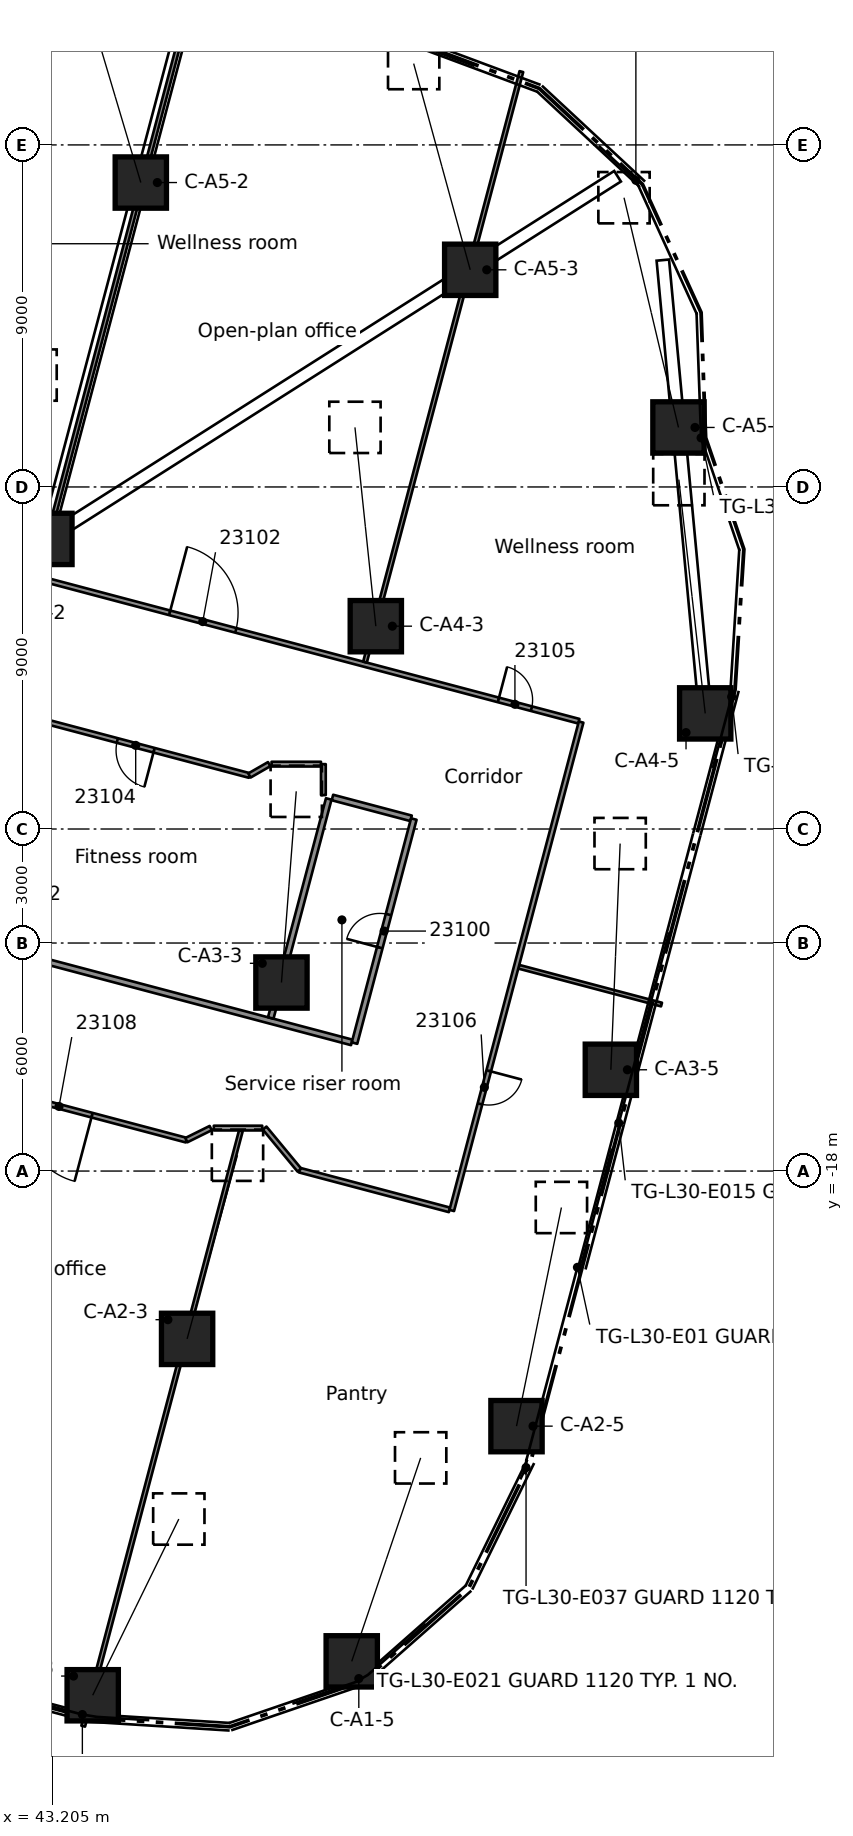
"""IFC4 building model, lengths in metres.
Left out: names, types, materials, properties, quantities, classifications, styles, units other than length and angle.
Written with IfcOpenShell. Run it as: python <this file> out.ifc"""

import sys

from ifc_helpers import new_model, si_unit, direction, frame, frame_2d, origin, origin_2d, place, context, subcontext, project, spatial, rectangle, extrude, element, fill, save


model = new_model("IFC4")
c1 = context("Model", 3, precision=1e-05, world=origin(), true_north=direction((0.0, 1.0)))
c2 = subcontext(c1, "Body", "Model", "MODEL_VIEW")
j1 = project(units=[si_unit("LENGTHUNIT", "METRE"), si_unit("PLANEANGLEUNIT", "RADIAN")], contexts=[c1])
p1 = place(None, origin())
s1 = spatial("IfcSite", under=j1, at=p1, CompositionType="ELEMENT")
p2 = place(p1, origin())
s2 = spatial("IfcBuilding", under=s1, at=p2, CompositionType="ELEMENT")
p3 = place(p2, frame((0.0, 0.0, 119.7)))
s3 = spatial("IfcBuildingStorey", under=s2, at=p3, CompositionType="ELEMENT", Elevation=119.7)
p4 = place(p3, frame((44.269, -31.793, 0.593), z_axis=(0.385435051293, 0.788769306025, 0.47883483907), x_axis=(-0.898467718032, 0.439039587798, 0.0)))
e1 = element("IfcColumn", 1, at=p4, inside=s3, PredefinedType="COLUMN", context=c2, shape_type="SweptSolid", body=[
    extrude(rectangle(XDim=1.35, YDim=1.35, at=origin_2d()), origin(), (0.0, 0.0, 1.0), 5.879),
])
p5 = place(p3, frame((51.085, -30.901, 0.605), z_axis=(0.287773476059, 0.849338432906, 0.442504974962), x_axis=(-0.94711260935, 0.320901394841, 0.0)))
e2 = element("IfcColumn", 2, at=p5, inside=s3, PredefinedType="COLUMN", context=c2, shape_type="SweptSolid", body=[
    extrude(rectangle(XDim=1.35, YDim=1.35, at=origin_2d()), origin(), (0.0, 0.0, 1.0), 6.303),
])
p6 = place(p3, frame((46.753, -22.416, 0.588), z_axis=(0.230570287465, 0.840104405285, 0.490980580837), x_axis=(-0.964339803907, 0.264667229933, 0.0)))
e3 = element("IfcColumn", 3, at=p6, inside=s3, PredefinedType="COLUMN", context=c2, shape_type="SweptSolid", body=[
    extrude(rectangle(XDim=1.35, YDim=1.35, at=origin_2d()), origin(), (0.0, 0.0, 1.0), 5.752),
])
p7 = place(p3, frame((55.421, -24.712, 0.61), z_axis=(0.181928790366, 0.885371750556, 0.42780694075), x_axis=(-0.979534245021, 0.201277576574, 0.0)))
e4 = element("IfcColumn", 4, at=p7, inside=s3, PredefinedType="COLUMN", context=c2, shape_type="SweptSolid", body=[
    extrude(rectangle(XDim=1.35, YDim=1.35, at=origin_2d()), origin(), (0.0, 0.0, 1.0), 6.498),
])
p8 = place(p3, frame((49.236, -13.039, 0.589), z_axis=(0.067270096291, 0.870203938653, 0.488077698013), x_axis=(-0.997025384371, 0.077073879619, 0.0)))
e5 = element("IfcColumn", 5, at=p8, inside=s3, PredefinedType="COLUMN", context=c2, shape_type="SweptSolid", body=[
    extrude(rectangle(XDim=1.35, YDim=1.35, at=origin_2d()), origin(), (0.0, 0.0, 1.0), 5.781),
])
p9 = place(p3, frame((57.904, -15.335, 0.612), z_axis=(0.037110733148, 0.905628191614, 0.422445703066), x_axis=(-0.999161462132, 0.040943529294, 0.0)))
e6 = element("IfcColumn", 6, at=p9, inside=s3, PredefinedType="COLUMN", context=c2, shape_type="SweptSolid", body=[
    extrude(rectangle(XDim=1.35, YDim=1.35, at=origin_2d()), origin(), (0.0, 0.0, 1.0), 6.572),
])
p10 = place(p3, frame((43.051, -1.367, 0.562), z_axis=(-0.077735925717, 0.829402402608, 0.553216757159), x_axis=(-0.995636518253, -0.093316255392, 0.0)))
e7 = element("IfcColumn", 7, at=p10, inside=s3, PredefinedType="COLUMN", context=c2, shape_type="SweptSolid", body=[
    extrude(rectangle(XDim=1.35, YDim=1.35, at=origin_2d()), origin(), (0.0, 0.0, 1.0), 5.198),
])
p11 = place(p3, frame((51.719, -3.663, 0.595), z_axis=(-0.092079198253, 0.877270333915, 0.471081927569), x_axis=(-0.994536691035, -0.104387595937, 0.0)))
e8 = element("IfcColumn", 8, at=p11, inside=s3, PredefinedType="COLUMN", context=c2, shape_type="SweptSolid", body=[
    extrude(rectangle(XDim=1.35, YDim=1.35, at=origin_2d()), origin(), (0.0, 0.0, 1.0), 5.963),
])
p12 = place(p3, frame((60.387, -5.958, 0.616), z_axis=(-0.102327587164, 0.907158183888, 0.408158173152), x_axis=(-0.993698136822, -0.112089307595, 0.0)))
e9 = element("IfcColumn", 9, at=p12, inside=s3, PredefinedType="COLUMN", context=c2, shape_type="SweptSolid", body=[
    extrude(rectangle(XDim=1.35, YDim=1.35, at=origin_2d()), origin(), (0.0, 0.0, 1.0), 6.781),
])
p13 = place(p3, frame((45.535, 8.01, 0.578), z_axis=(-0.244240111636, 0.820186799174, 0.517339716558), x_axis=(-0.958408331569, -0.285400543061, 0.0)))
e10 = element("IfcColumn", 10, at=p13, inside=s3, PredefinedType="COLUMN", context=c2, shape_type="SweptSolid", body=[
    extrude(rectangle(XDim=1.35, YDim=1.35, at=origin_2d()), origin(), (0.0, 0.0, 1.0), 5.499),
])
p14 = place(p3, frame((54.203, 5.714, 0.605), z_axis=(-0.236905885144, 0.86396396315, 0.444344316901), x_axis=(-0.964400394213, -0.264446364396, 0.0)))
e11 = element("IfcColumn", 11, at=p14, inside=s3, PredefinedType="COLUMN", context=c2, shape_type="SweptSolid", body=[
    extrude(rectangle(XDim=1.35, YDim=1.35, at=origin_2d()), origin(), (0.0, 0.0, 1.0), 6.28),
])
p15 = place(p3, frame((59.683, 1.566, 0.617), z_axis=(-0.210720596, 0.888867577098, 0.40683075204), x_axis=(-0.973031331212, -0.230672990356, 0.0)))
e12 = element("IfcColumn", 12, at=p15, inside=s3, PredefinedType="COLUMN", context=c2, shape_type="SweptSolid", body=[
    extrude(rectangle(XDim=1.35, YDim=1.35, at=origin_2d()), origin(), (0.0, 0.0, 1.0), 6.801),
])
p16 = place(p3, frame((53.657, -19.021, 0.0), z_axis=(0.0, 0.0, 1.0), x_axis=(-0.966669998508, 0.25602561197, 0.0)))
e13 = element("IfcWall", 13, at=p16, inside=s3, PredefinedType="PARTITIONING", context=c2, shape_type="SweptSolid", body=[
    extrude(rectangle(XDim=4.085, YDim=0.125, at=frame_2d((2.042, 0.0))), origin(), (0.0, 0.0, 1.0), 3.58),
])
p17 = place(p3, frame((46.733, -17.187, 0.0), z_axis=(0.0, 0.0, 1.0), x_axis=(-0.966684476385, 0.255970941937, 0.0)))
e14 = element("IfcWall", 14, at=p17, inside=s3, PredefinedType="PARTITIONING", context=c2, shape_type="SweptSolid", body=[
    extrude(rectangle(XDim=17.807, YDim=0.125, at=frame_2d((8.904, 0.0))), origin(), (0.0, 0.0, 1.0), 3.58),
])
p18 = place(p17, frame((11.925, 0.0, 0.0)))
e15 = element("IfcOpeningElement", 15, at=p18, cuts=e14, PredefinedType="OPENING", context=c2, shape_type="SweptSolid", body=[
    extrude(rectangle(XDim=1.8, YDim=2.1, at=frame_2d((0.9, 1.05))), frame((0.0, 0.073, 0.0), z_axis=(0.0, -1.0, 0.0), x_axis=(1.0, 0.0, 0.0)), (0.0, 0.0, 1.0), 0.145),
])
p19 = place(p17, frame((2.566, 0.0, 0.0)))
e16 = element("IfcOpeningElement", 16, at=p19, cuts=e14, PredefinedType="OPENING", context=c2, shape_type="SweptSolid", body=[
    extrude(rectangle(XDim=1.8, YDim=2.1, at=frame_2d((0.9, 1.05))), frame((0.0, 0.073, 0.0), z_axis=(0.0, -1.0, 0.0), x_axis=(1.0, 0.0, 0.0)), (0.0, 0.0, 1.0), 0.145),
])
p20 = place(p3, frame((30.589, -9.187, 0.0), z_axis=(0.0, 0.0, 1.0), x_axis=(0.966677828303, -0.255996047367, 0.0)))
e17 = element("IfcWall", 17, at=p20, inside=s3, PredefinedType="PARTITIONING", context=c2, shape_type="SweptSolid", body=[
    extrude(rectangle(XDim=21.203, YDim=0.15, at=frame_2d((10.602, 0.0))), origin(), (0.0, 0.0, 1.0), 3.58),
])
p21 = place(p20, frame((4.6, 0.0, 0.0)))
e18 = element("IfcOpeningElement", 18, at=p21, cuts=e17, PredefinedType="OPENING", context=c2, shape_type="SweptSolid", body=[
    extrude(rectangle(XDim=0.9, YDim=2.1, at=frame_2d((0.45, 1.05))), frame((0.0, 0.085, 0.0), z_axis=(0.0, -1.0, 0.0), x_axis=(1.0, 0.0, 0.0)), (0.0, 0.0, 1.0), 0.17),
])
p22 = place(p3, frame((55.48, -12.624, 0.0), z_axis=(0.0, 0.0, 1.0), x_axis=(0.966682829602, -0.255977161, 0.0)))
e19 = element("IfcWall", 19, at=p22, inside=s3, PredefinedType="PARTITIONING", context=c2, shape_type="SweptSolid", body=[
    extrude(rectangle(XDim=3.886, YDim=0.1, at=frame_2d((1.943, 0.0))), origin(), (0.0, 0.0, 1.0), 3.58),
])
p23 = place(p3, frame((48.393, -7.592, 0.0), z_axis=(0.0, 0.0, 1.0), x_axis=(-0.966683482387, 0.255974695781, 0.0)))
e20 = element("IfcWall", 20, at=p23, inside=s3, PredefinedType="PARTITIONING", context=c2, shape_type="SweptSolid", body=[
    extrude(rectangle(XDim=16.748, YDim=0.125, at=frame_2d((8.374, 0.0))), origin(), (0.0, 0.0, 1.0), 3.58),
])
p24 = place(p23, frame((2.596, 0.0, 0.0)))
e21 = element("IfcOpeningElement", 21, at=p24, cuts=e20, PredefinedType="OPENING", context=c2, shape_type="SweptSolid", body=[
    extrude(rectangle(XDim=1.0, YDim=2.1, at=frame_2d((0.5, 1.05))), frame((0.0, 0.073, 0.0), z_axis=(0.0, -1.0, 0.0), x_axis=(1.0, 0.0, 0.0)), (0.0, 0.0, 1.0), 0.145),
])
p25 = place(p3, frame((50.578, -8.171, 0.0), z_axis=(0.0, 0.0, 1.0), x_axis=(0.966659569992, -0.256064983437, 0.0)))
e22 = element("IfcWall", 22, at=p25, inside=s3, PredefinedType="PARTITIONING", context=c2, shape_type="SweptSolid", body=[
    extrude(rectangle(XDim=2.14, YDim=0.15, at=frame_2d((1.07, 0.0))), origin(), (0.0, 0.0, 1.0), 3.58),
])
p26 = place(p3, frame((32.9, 0.236, 0.0), z_axis=(0.0, 0.0, 1.0), x_axis=(0.966662717932, -0.256053099493, 0.0)))
e23 = element("IfcWall", 23, at=p26, inside=s3, PredefinedType="PARTITIONING", context=c2, shape_type="SweptSolid", body=[
    extrude(rectangle(XDim=24.995, YDim=0.125, at=frame_2d((12.498, 0.0))), origin(), (0.0, 0.0, 1.0), 3.58),
])
p27 = place(p26, frame((4.55, 0.0, 0.0)))
e24 = element("IfcOpeningElement", 24, at=p27, cuts=e23, PredefinedType="OPENING", context=c2, shape_type="SweptSolid", body=[
    extrude(rectangle(XDim=0.9, YDim=2.1, at=frame_2d((0.45, 1.05))), frame((0.0, 0.073, 0.0), z_axis=(0.0, -1.0, 0.0), x_axis=(1.0, 0.0, 0.0)), (0.0, 0.0, 1.0), 0.145),
])
p28 = place(p26, frame((13.857, 0.0, 0.0)))
e25 = element("IfcOpeningElement", 25, at=p28, cuts=e23, PredefinedType="OPENING", context=c2, shape_type="SweptSolid", body=[
    extrude(rectangle(XDim=1.8, YDim=2.1, at=frame_2d((0.9, 1.05))), frame((0.0, 0.073, 0.0), z_axis=(0.0, -1.0, 0.0), x_axis=(1.0, 0.0, 0.0)), (0.0, 0.0, 1.0), 0.145),
])
p29 = place(p26, frame((22.805, 0.0, 0.0)))
e26 = element("IfcOpeningElement", 26, at=p29, cuts=e23, PredefinedType="OPENING", context=c2, shape_type="SweptSolid", body=[
    extrude(rectangle(XDim=0.9, YDim=2.1, at=frame_2d((0.45, 1.05))), frame((0.0, 0.073, 0.0), z_axis=(0.0, -1.0, 0.0), x_axis=(1.0, 0.0, 0.0)), (0.0, 0.0, 1.0), 0.145),
])
p30 = place(p3, frame((47.456, -16.869, 0.0), z_axis=(0.0, 0.0, 1.0), x_axis=(1.0, 0.0, 0.0)))
e27 = element("IfcWall", 27, at=p30, inside=s3, PredefinedType="PARTITIONING", context=c2, shape_type="SweptSolid", body=[
    extrude(rectangle(XDim=1.274, YDim=0.125, at=frame_2d((0.637, 0.0))), origin(), (0.0, 0.0, 1.0), 3.58),
])
p31 = place(p3, frame((48.975, -7.293, 0.0), z_axis=(0.0, 0.0, 1.0), x_axis=(1.0, 0.0, 0.0)))
e28 = element("IfcWall", 28, at=p31, inside=s3, PredefinedType="PARTITIONING", context=c2, shape_type="SweptSolid", body=[
    extrude(rectangle(XDim=1.301, YDim=0.125, at=frame_2d((0.65, 0.0))), origin(), (0.0, 0.0, 1.0), 3.58),
])
p32 = place(p3, frame((46.733, -17.187, 0.0), z_axis=(0.0, 0.0, 1.0), x_axis=(0.895787517552, 0.444482534413, 0.0)))
e29 = element("IfcWall", 29, at=p32, inside=s3, PredefinedType="PARTITIONING", context=c2, shape_type="SweptSolid", body=[
    extrude(rectangle(XDim=0.716, YDim=0.125, at=frame_2d((0.358, 0.0))), origin(), (0.0, 0.0, 1.0), 3.58),
])
p33 = place(p3, frame((57.121, -6.186, 0.0), z_axis=(0.0, 0.0, 1.0), x_axis=(-0.256054079854, -0.96666245825, 0.0)))
e30 = element("IfcWall", 30, at=p33, inside=s3, PredefinedType="PARTITIONING", context=c2, shape_type="SweptSolid", body=[
    extrude(rectangle(XDim=13.294, YDim=0.125, at=frame_2d((6.647, 0.0))), origin(), (0.0, 0.0, 1.0), 3.58),
])
p34 = place(p33, frame((9.493, 0.0, 0.0)))
e31 = element("IfcOpeningElement", 31, at=p34, cuts=e30, PredefinedType="OPENING", context=c2, shape_type="SweptSolid", body=[
    extrude(rectangle(XDim=0.9, YDim=2.1, at=frame_2d((0.45, 1.05))), frame((0.0, 0.073, 0.0), z_axis=(0.0, -1.0, 0.0), x_axis=(1.0, 0.0, 0.0)), (0.0, 0.0, 1.0), 0.145),
])
p35 = place(p3, frame((51.158, -14.634, 0.0), z_axis=(0.0, 0.0, 1.0), x_axis=(0.255943170155, 0.966691829722, 0.0)))
e32 = element("IfcWall", 32, at=p35, inside=s3, PredefinedType="PARTITIONING", context=c2, shape_type="SweptSolid", body=[
    extrude(rectangle(XDim=6.099, YDim=0.15, at=frame_2d((3.05, 0.0))), origin(), (0.0, 0.0, 1.0), 3.58),
])
p36 = place(p35, frame((2.6, 0.0, 0.0)))
e33 = element("IfcOpeningElement", 33, at=p36, cuts=e32, PredefinedType="OPENING", context=c2, shape_type="SweptSolid", body=[
    extrude(rectangle(XDim=0.9, YDim=2.1, at=frame_2d((0.45, 1.05))), frame((0.0, 0.085, 0.0), z_axis=(0.0, -1.0, 0.0), x_axis=(1.0, 0.0, 0.0)), (0.0, 0.0, 1.0), 0.17),
])
p37 = place(p3, frame((44.019, -32.606, 0.0), z_axis=(0.0, 0.0, 1.0), x_axis=(0.256017225192, 0.966672219734, 0.0)))
e34 = element("IfcWall", 34, at=p37, inside=s3, PredefinedType="PARTITIONING", context=c2, shape_type="SweptSolid", body=[
    extrude(rectangle(XDim=16.202, YDim=0.1, at=frame_2d((8.101, 0.0))), origin(), (0.0, 0.0, 1.0), 3.58),
])
p38 = place(p3, frame((48.954, -13.972, 0.0), z_axis=(0.0, 0.0, 1.0), x_axis=(0.255954468908, 0.966688838172, 0.0)))
e35 = element("IfcWall", 35, at=p38, inside=s3, PredefinedType="PARTITIONING", context=c2, shape_type="SweptSolid", body=[
    extrude(rectangle(XDim=5.961, YDim=0.15, at=frame_2d((2.981, 0.0))), origin(), (0.0, 0.0, 1.0), 3.58),
])
p39 = place(p3, frame((51.434, -4.609, 0.0), z_axis=(0.0, 0.0, 1.0), x_axis=(0.256010706038, 0.966673946268, 0.0)))
e36 = element("IfcWall", 36, at=p39, inside=s3, PredefinedType="PARTITIONING", context=c2, shape_type="SweptSolid", body=[
    extrude(rectangle(XDim=16.073, YDim=0.1, at=frame_2d((8.037, 0.0))), origin(), (0.0, 0.0, 1.0), 3.58),
])
p40 = place(p3, frame((42.831, -2.33, 0.0), z_axis=(0.0, 0.0, 1.0), x_axis=(0.255993185123, 0.966678586279, 0.0)))
e37 = element("IfcWall", 37, at=p40, inside=s3, PredefinedType="PARTITIONING", context=c2, shape_type="SweptSolid", body=[
    extrude(rectangle(XDim=15.805, YDim=0.1, at=frame_2d((7.902, 0.0))), origin(), (0.0, 0.0, 1.0), 3.58),
])
p41 = place(p3, frame((48.393, -7.592, 0.0), z_axis=(0.0, 0.0, 1.0), x_axis=(0.866862333103, 0.49854758594, 0.0)))
e38 = element("IfcWall", 38, at=p41, inside=s3, PredefinedType="PARTITIONING", context=c2, shape_type="SweptSolid", body=[
    extrude(rectangle(XDim=0.6, YDim=0.125, at=frame_2d((0.3, 0.0))), origin(), (0.0, 0.0, 1.0), 3.58),
])
p42 = place(p3, frame((50.339, -8.108, 0.0), z_axis=(0.0, 0.0, 1.0), x_axis=(0.0, 1.0, 0.0)))
e39 = element("IfcWall", 39, at=p42, inside=s3, PredefinedType="PARTITIONING", context=c2, shape_type="SweptSolid", body=[
    extrude(rectangle(XDim=0.815, YDim=0.125, at=frame_2d((0.407, 0.0))), origin(), (0.0, 0.0, 1.0), 3.58),
])
p43 = place(p3, frame((49.708, -17.975, 0.0), z_axis=(0.0, 0.0, 1.0), x_axis=(-0.637386714636, 0.770544077912, 0.0)))
e40 = element("IfcWall", 40, at=p43, inside=s3, PredefinedType="PARTITIONING", context=c2, shape_type="SweptSolid", body=[
    extrude(rectangle(XDim=1.436, YDim=0.125, at=frame_2d((0.718, 0.0))), origin(), (0.0, 0.0, 1.0), 3.58),
])
p44 = place(p36, origin())
e41 = element("IfcDoor", 41, at=p44, inside=s3, OperationType="SINGLE_SWING_RIGHT", PredefinedType="DOOR", context=c2, shape_type="SweptSolid", body=[
    extrude(rectangle(XDim=0.9, YDim=2.1, at=frame_2d((0.45, 1.05))), frame((0.0, 0.025, 0.0), z_axis=(0.0, -1.0, 0.0), x_axis=(1.0, 0.0, 0.0)), (0.0, 0.0, 1.0), 0.05),
])
fill(e33, e41)
p45 = place(p28, origin())
e42 = element("IfcDoor", 42, at=p45, inside=s3, OperationType="DOUBLE_DOOR_SINGLE_SWING", PredefinedType="DOOR", context=c2, shape_type="SweptSolid", body=[
    extrude(rectangle(XDim=1.8, YDim=2.1, at=frame_2d((0.9, 1.05))), frame((0.0, 0.025, 0.0), z_axis=(0.0, -1.0, 0.0), x_axis=(1.0, 0.0, 0.0)), (0.0, 0.0, 1.0), 0.05),
])
fill(e25, e42)
p46 = place(p24, origin())
e43 = element("IfcDoor", 43, at=p46, inside=s3, OperationType="SINGLE_SWING_LEFT", PredefinedType="DOOR", context=c2, shape_type="SweptSolid", body=[
    extrude(rectangle(XDim=1.0, YDim=2.1, at=frame_2d((0.5, 1.05))), frame((0.0, 0.025, 0.0), z_axis=(0.0, -1.0, 0.0), x_axis=(1.0, 0.0, 0.0)), (0.0, 0.0, 1.0), 0.05),
])
fill(e21, e43)
p47 = place(p29, origin())
e44 = element("IfcDoor", 44, at=p47, inside=s3, OperationType="SINGLE_SWING_RIGHT", PredefinedType="DOOR", context=c2, shape_type="SweptSolid", body=[
    extrude(rectangle(XDim=0.9, YDim=2.1, at=frame_2d((0.45, 1.05))), frame((0.0, 0.025, 0.0), z_axis=(0.0, -1.0, 0.0), x_axis=(1.0, 0.0, 0.0)), (0.0, 0.0, 1.0), 0.05),
])
fill(e26, e44)
p48 = place(p34, origin())
e45 = element("IfcDoor", 45, at=p48, inside=s3, OperationType="SINGLE_SWING_RIGHT", PredefinedType="DOOR", context=c2, shape_type="SweptSolid", body=[
    extrude(rectangle(XDim=0.9, YDim=2.1, at=frame_2d((0.45, 1.05))), frame((0.0, 0.025, 0.0), z_axis=(0.0, -1.0, 0.0), x_axis=(1.0, 0.0, 0.0)), (0.0, 0.0, 1.0), 0.05),
])
fill(e31, e45)
p49 = place(p19, origin())
e46 = element("IfcDoor", 46, at=p49, inside=s3, OperationType="DOUBLE_DOOR_SINGLE_SWING", PredefinedType="DOOR", context=c2, shape_type="SweptSolid", body=[
    extrude(rectangle(XDim=1.8, YDim=2.1, at=frame_2d((0.9, 1.05))), frame((0.0, 0.025, 0.0), z_axis=(0.0, -1.0, 0.0), x_axis=(1.0, 0.0, 0.0)), (0.0, 0.0, 1.0), 0.05),
])
fill(e16, e46)
save(model, sys.argv[1])
